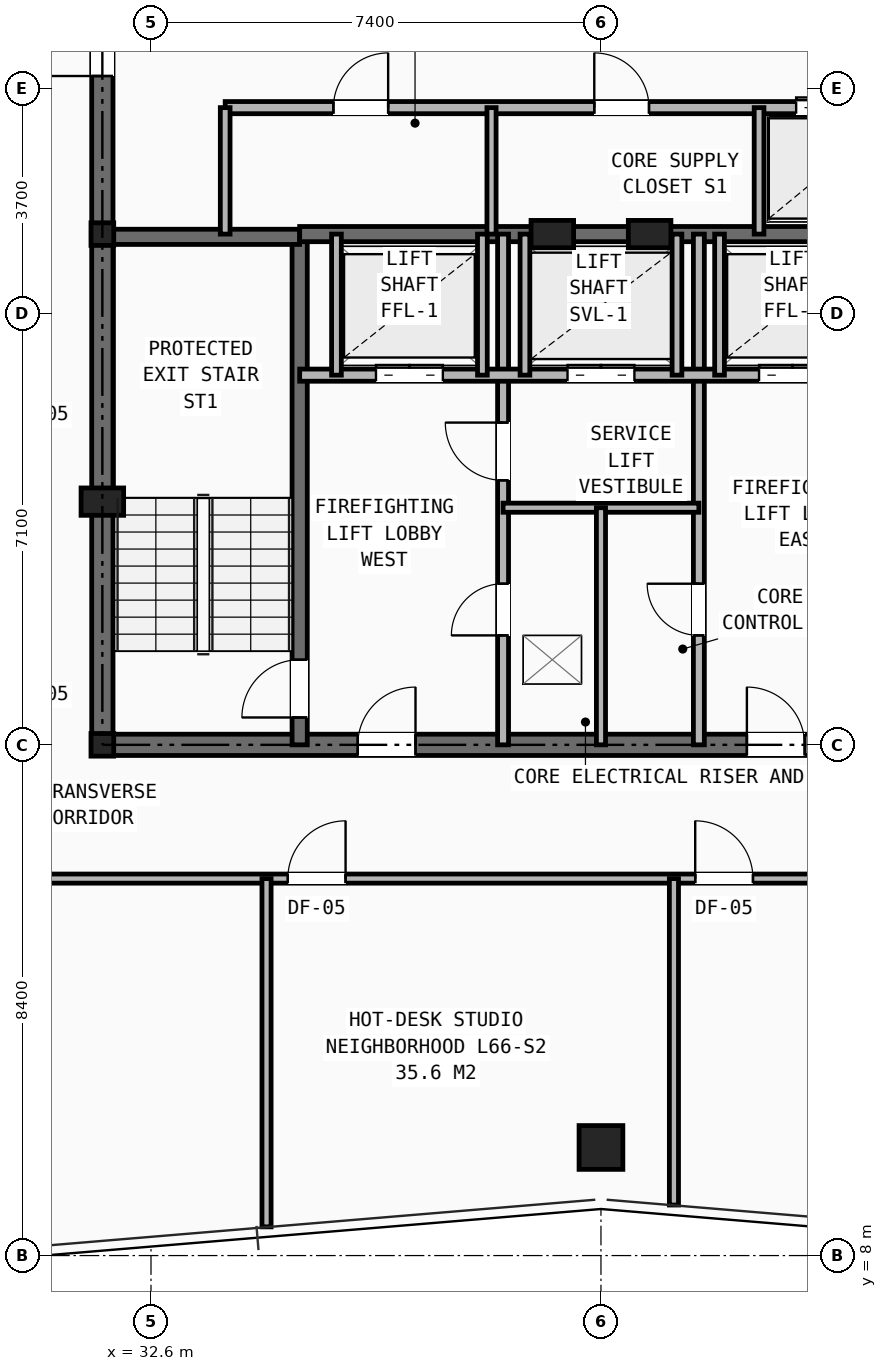
"""IFC4 building model, lengths in metres.
Left out: names, types, materials, properties, quantities, classifications, styles, units other than length and angle.
Written with IfcOpenShell. Run it as: python <this file> out.ifc"""

import sys

from ifc_helpers import new_model, si_unit, direction, frame, frame_2d, origin, origin_2d, place, context, subcontext, project, spatial, rectangle, hollow_rectangle, i_section, extrude, element, fill, save


model = new_model("IFC4")
c1 = context("Model", 3, precision=1e-05, world=origin(), true_north=direction((0.0, 1.0)))
c2 = subcontext(c1, "Body", "Model", "MODEL_VIEW")
j1 = project(units=[si_unit("LENGTHUNIT", "METRE"), si_unit("PLANEANGLEUNIT", "RADIAN")], contexts=[c1])
p1 = place(None, origin())
s1 = spatial("IfcSite", under=j1, at=p1, CompositionType="ELEMENT")
p2 = place(p1, origin())
s2 = spatial("IfcBuilding", under=s1, at=p2, CompositionType="ELEMENT")
p3 = place(p2, frame((0.0, 0.0, 232.9)))
s3 = spatial("IfcBuildingStorey", under=s2, at=p3, CompositionType="ELEMENT", Elevation=232.9)
for number, where, z_axis, x_axis in (
    (1, (31.8, 16.4, 0.0), (0.0, 0.0, 1.0), (1.0, 0.0, 0.0)),
    (2, (31.8, 24.8, 0.0), (0.0, 0.0, 1.0), (1.0, 0.0, 0.0)),
):
    element("IfcColumn", number, at=place(p3, frame(where, z_axis=z_axis, x_axis=x_axis)), inside=s3, PredefinedType="COLUMN", context=c2, shape_type="SweptSolid", body=[
        extrude(i_section(OverallWidth=0.374, OverallDepth=0.372, WebThickness=0.016, FlangeThickness=0.026, at=origin_2d()), origin(), (0.0, 0.0, 1.0), 3.5),
    ])
for number, where, z_axis, x_axis in (
    (3, (31.8, 20.4, 0.0), (0.0, 0.0, 1.0), (1.0, 0.0, 0.0)),
    (4, (39.2, 24.8, 0.0), (0.0, 0.0, 1.0), (1.0, 0.0, 0.0)),
    (5, (40.8, 24.8, 0.0), (0.0, 0.0, 1.0), (1.0, 0.0, 0.0)),
):
    element("IfcColumn", number, at=place(p3, frame(where, z_axis=z_axis, x_axis=x_axis)), inside=s3, PredefinedType="PILASTER", context=c2, shape_type="SweptSolid", body=[
        extrude(rectangle(XDim=0.7, YDim=0.45, at=origin_2d()), origin(), (0.0, 0.0, 1.0), 3.5),
    ])
p4 = place(p3, frame((40.0, 9.778, 0.0), z_axis=(0.0, 0.0, 1.0), x_axis=(1.0, 0.0, 0.0)))
e6 = element("IfcColumn", 6, at=p4, inside=s3, PredefinedType="COLUMN", context=c2, shape_type="SweptSolid", body=[
    extrude(hollow_rectangle(XDim=0.72, YDim=0.72, WallThickness=0.05, at=origin_2d()), origin(), (0.0, 0.0, 1.0), 3.5),
])
p5 = place(p3, frame((31.8, 16.4, 0.0), z_axis=(0.0, 0.0, 1.0), x_axis=(1.0, 0.0, 0.0)))
e7 = element("IfcWall", 7, at=p5, inside=s3, PredefinedType="SHEAR", context=c2, shape_type="SweptSolid", body=[
    extrude(rectangle(XDim=16.4, YDim=0.35, at=frame_2d((8.2, 0.0))), origin(), (0.0, 0.0, 1.0), 3.25),
])
p6 = place(p5, frame((4.2, 0.0, 0.0)))
e8 = element("IfcOpeningElement", 8, at=p6, cuts=e7, PredefinedType="OPENING", context=c2, shape_type="SweptSolid", body=[
    extrude(rectangle(XDim=0.95, YDim=2.1, at=frame_2d((0.475, 1.05))), frame((0.0, 0.185, 0.0), z_axis=(0.0, -1.0, 0.0), x_axis=(1.0, 0.0, 0.0)), (0.0, 0.0, 1.0), 0.37),
])
p7 = place(p5, frame((10.6, 0.0, 0.0)))
e9 = element("IfcOpeningElement", 9, at=p7, cuts=e7, PredefinedType="OPENING", context=c2, shape_type="SweptSolid", body=[
    extrude(rectangle(XDim=0.95, YDim=2.1, at=frame_2d((0.475, 1.05))), frame((0.0, 0.185, 0.0), z_axis=(0.0, -1.0, 0.0), x_axis=(1.0, 0.0, 0.0)), (0.0, 0.0, 1.0), 0.37),
])
p8 = place(p3, frame((31.8, 16.4, 0.0), z_axis=(0.0, 0.0, 1.0), x_axis=(0.0, 1.0, 0.0)))
e10 = element("IfcWall", 10, at=p8, inside=s3, PredefinedType="SHEAR", context=c2, shape_type="SweptSolid", body=[
    extrude(rectangle(XDim=14.8, YDim=0.35, at=frame_2d((7.4, 0.0))), origin(), (0.0, 0.0, 1.0), 3.25),
])
p9 = place(p8, frame((11.0, 0.0, 0.0)))
e11 = element("IfcOpeningElement", 11, at=p9, cuts=e10, PredefinedType="OPENING", context=c2, shape_type="SweptSolid", body=[
    extrude(rectangle(XDim=1.1, YDim=2.15, at=frame_2d((0.55, 1.075))), frame((0.0, 0.185, 0.0), z_axis=(0.0, -1.0, 0.0), x_axis=(1.0, 0.0, 0.0)), (0.0, 0.0, 1.0), 0.37),
])
p10 = place(p3, frame((35.045, 16.4, 0.0), z_axis=(0.0, 0.0, 1.0), x_axis=(0.0, 1.0, 0.0)))
e12 = element("IfcWall", 12, at=p10, inside=s3, PredefinedType="SHEAR", context=c2, shape_type="SweptSolid", body=[
    extrude(rectangle(XDim=8.4, YDim=0.25, at=frame_2d((4.2, 0.0))), origin(), (0.0, 0.0, 1.0), 3.25),
])
p11 = place(p10, frame((0.45, 0.0, 0.0)))
e13 = element("IfcOpeningElement", 13, at=p11, cuts=e12, PredefinedType="OPENING", context=c2, shape_type="SweptSolid", body=[
    extrude(rectangle(XDim=0.95, YDim=2.1, at=frame_2d((0.475, 1.05))), frame((0.0, 0.135, 0.0), z_axis=(0.0, -1.0, 0.0), x_axis=(1.0, 0.0, 0.0)), (0.0, 0.0, 1.0), 0.27),
])
p12 = place(p3, frame((31.8, 24.755, 0.0), z_axis=(0.0, 0.0, 1.0), x_axis=(1.0, 0.0, 0.0)))
e14 = element("IfcWall", 14, at=p12, inside=s3, PredefinedType="SHEAR", context=c2, shape_type="SweptSolid", body=[
    extrude(rectangle(XDim=3.245, YDim=0.25, at=frame_2d((1.623, 0.0))), origin(), (0.0, 0.0, 1.0), 3.25),
])
p13 = place(p3, frame((35.045, 24.8, 0.0), z_axis=(0.0, 0.0, 1.0), x_axis=(1.0, 0.0, 0.0)))
e15 = element("IfcWall", 15, at=p13, inside=s3, PredefinedType="SHEAR", context=c2, shape_type="SweptSolid", body=[
    extrude(rectangle(XDim=9.91, YDim=0.25, at=frame_2d((4.955, 0.0))), origin(), (0.0, 0.0, 1.0), 3.25),
])
p14 = place(p3, frame((38.39, 16.4, 0.0), z_axis=(0.0, 0.0, 1.0), x_axis=(0.0, 1.0, 0.0)))
e16 = element("IfcWall", 16, at=p14, inside=s3, PredefinedType="PARTITIONING", context=c2, shape_type="SweptSolid", body=[
    extrude(rectangle(XDim=8.4, YDim=0.18, at=frame_2d((4.2, 0.0))), origin(), (0.0, 0.0, 1.0), 2.705),
])
p15 = place(p14, frame((1.8, 0.0, 0.0)))
e17 = element("IfcOpeningElement", 17, at=p15, cuts=e16, PredefinedType="OPENING", context=c2, shape_type="SweptSolid", body=[
    extrude(rectangle(XDim=0.85, YDim=2.05, at=frame_2d((0.425, 1.025))), frame((0.0, 0.1, 0.0), z_axis=(0.0, -1.0, 0.0), x_axis=(1.0, 0.0, 0.0)), (0.0, 0.0, 1.0), 0.2),
])
p16 = place(p14, frame((4.35, 0.0, 0.0)))
e18 = element("IfcOpeningElement", 18, at=p16, cuts=e16, PredefinedType="OPENING", context=c2, shape_type="SweptSolid", body=[
    extrude(rectangle(XDim=0.95, YDim=2.1, at=frame_2d((0.475, 1.05))), frame((0.0, 0.1, 0.0), z_axis=(0.0, -1.0, 0.0), x_axis=(1.0, 0.0, 0.0)), (0.0, 0.0, 1.0), 0.2),
])
p17 = place(p3, frame((41.61, 16.4, 0.0), z_axis=(0.0, 0.0, 1.0), x_axis=(0.0, 1.0, 0.0)))
e19 = element("IfcWall", 19, at=p17, inside=s3, PredefinedType="PARTITIONING", context=c2, shape_type="SweptSolid", body=[
    extrude(rectangle(XDim=8.4, YDim=0.18, at=frame_2d((4.2, 0.0))), origin(), (0.0, 0.0, 1.0), 2.705),
])
p18 = place(p17, frame((1.8, 0.0, 0.0)))
e20 = element("IfcOpeningElement", 20, at=p18, cuts=e19, PredefinedType="OPENING", context=c2, shape_type="SweptSolid", body=[
    extrude(rectangle(XDim=0.85, YDim=2.05, at=frame_2d((0.425, 1.025))), frame((0.0, 0.1, 0.0), z_axis=(0.0, -1.0, 0.0), x_axis=(1.0, 0.0, 0.0)), (0.0, 0.0, 1.0), 0.2),
])
p19 = place(p3, frame((35.045, 22.48, 0.0), z_axis=(0.0, 0.0, 1.0), x_axis=(1.0, 0.0, 0.0)))
e21 = element("IfcWall", 21, at=p19, inside=s3, PredefinedType="SOLIDWALL", context=c2, shape_type="SweptSolid", body=[
    extrude(rectangle(XDim=9.91, YDim=0.2, at=frame_2d((4.955, 0.0))), origin(), (0.0, 0.0, 1.0), 3.25),
])
p20 = place(p19, frame((1.255, 0.0, 0.0)))
e22 = element("IfcOpeningElement", 22, at=p20, cuts=e21, PredefinedType="OPENING", context=c2, shape_type="SweptSolid", body=[
    extrude(rectangle(XDim=1.1, YDim=2.15, at=frame_2d((0.55, 1.075))), frame((0.0, 0.11, 0.0), z_axis=(0.0, -1.0, 0.0), x_axis=(1.0, 0.0, 0.0)), (0.0, 0.0, 1.0), 0.22),
])
p21 = place(p19, frame((7.555, 0.0, 0.0)))
e23 = element("IfcOpeningElement", 23, at=p21, cuts=e21, PredefinedType="OPENING", context=c2, shape_type="SweptSolid", body=[
    extrude(rectangle(XDim=1.1, YDim=2.15, at=frame_2d((0.55, 1.075))), frame((0.0, 0.11, 0.0), z_axis=(0.0, -1.0, 0.0), x_axis=(1.0, 0.0, 0.0)), (0.0, 0.0, 1.0), 0.22),
])
p22 = place(p19, frame((4.405, 0.0, 0.0)))
e24 = element("IfcOpeningElement", 24, at=p22, cuts=e21, PredefinedType="OPENING", context=c2, shape_type="SweptSolid", body=[
    extrude(rectangle(XDim=1.1, YDim=2.15, at=frame_2d((0.55, 1.075))), frame((0.0, 0.11, 0.0), z_axis=(0.0, -1.0, 0.0), x_axis=(1.0, 0.0, 0.0)), (0.0, 0.0, 1.0), 0.22),
])
p23 = place(p3, frame((38.39, 20.3, 0.0), z_axis=(0.0, 0.0, 1.0), x_axis=(1.0, 0.0, 0.0)))
e25 = element("IfcWall", 25, at=p23, inside=s3, PredefinedType="PARTITIONING", context=c2, shape_type="SweptSolid", body=[
    extrude(rectangle(XDim=3.22, YDim=0.15, at=frame_2d((1.61, 0.0))), origin(), (0.0, 0.0, 1.0), 3.25),
])
p24 = place(p3, frame((40.0, 16.4, 0.0), z_axis=(0.0, 0.0, 1.0), x_axis=(0.0, 1.0, 0.0)))
e26 = element("IfcWall", 26, at=p24, inside=s3, PredefinedType="PARTITIONING", context=c2, shape_type="SweptSolid", body=[
    extrude(rectangle(XDim=3.9, YDim=0.15, at=frame_2d((1.95, 0.0))), origin(), (0.0, 0.0, 1.0), 2.705),
])
for number, where, z_axis, x_axis in (
    (27, (35.65, 22.48, 0.0), (0.0, 0.0, 1.0), (0.0, 1.0, 0.0)),
    (28, (38.05, 22.48, 0.0), (0.0, 0.0, 1.0), (0.0, 1.0, 0.0)),
    (29, (41.95, 22.48, 0.0), (0.0, 0.0, 1.0), (0.0, 1.0, 0.0)),
    (30, (38.75, 22.48, 0.0), (0.0, 0.0, 1.0), (0.0, 1.0, 0.0)),
    (31, (41.25, 22.48, 0.0), (0.0, 0.0, 1.0), (0.0, 1.0, 0.0)),
):
    element("IfcWall", number, at=place(p3, frame(where, z_axis=z_axis, x_axis=x_axis)), inside=s3, PredefinedType="SOLIDWALL", context=c2, shape_type="SweptSolid", body=[
        extrude(rectangle(XDim=2.32, YDim=0.16, at=frame_2d((1.16, 0.0))), origin(), (0.0, 0.0, 1.0), 3.25),
    ])
p25 = place(p3, frame((33.82, 26.88, 0.0), z_axis=(0.0, 0.0, 1.0), x_axis=(1.0, 0.0, 0.0)))
e32 = element("IfcWall", 32, at=p25, inside=s3, PredefinedType="SOLIDWALL", context=c2, shape_type="SweptSolid", body=[
    extrude(rectangle(XDim=14.38, YDim=0.2, at=frame_2d((7.19, 0.0))), origin(), (0.0, 0.0, 1.0), 2.705),
])
p26 = place(p25, frame((1.78, 0.0, 0.0)))
e33 = element("IfcOpeningElement", 33, at=p26, cuts=e32, PredefinedType="OPENING", context=c2, shape_type="SweptSolid", body=[
    extrude(rectangle(XDim=0.9, YDim=2.1, at=frame_2d((0.45, 1.05))), frame((0.0, 0.11, 0.0), z_axis=(0.0, -1.0, 0.0), x_axis=(1.0, 0.0, 0.0)), (0.0, 0.0, 1.0), 0.22),
])
p27 = place(p25, frame((6.07, 0.0, 0.0)))
e34 = element("IfcOpeningElement", 34, at=p27, cuts=e32, PredefinedType="OPENING", context=c2, shape_type="SweptSolid", body=[
    extrude(rectangle(XDim=0.9, YDim=2.1, at=frame_2d((0.45, 1.05))), frame((0.0, 0.11, 0.0), z_axis=(0.0, -1.0, 0.0), x_axis=(1.0, 0.0, 0.0)), (0.0, 0.0, 1.0), 0.22),
])
p28 = place(p25, frame((9.39, 0.0, 0.0)))
e35 = element("IfcOpeningElement", 35, at=p28, cuts=e32, PredefinedType="OPENING", context=c2, shape_type="SweptSolid", body=[
    extrude(rectangle(XDim=1.1, YDim=2.15, at=frame_2d((0.55, 1.075))), frame((0.0, 0.11, 0.0), z_axis=(0.0, -1.0, 0.0), x_axis=(1.0, 0.0, 0.0)), (0.0, 0.0, 1.0), 0.22),
])
p29 = place(p25, frame((11.71, 0.0, 0.0)))
e36 = element("IfcOpeningElement", 36, at=p29, cuts=e32, PredefinedType="OPENING", context=c2, shape_type="SweptSolid", body=[
    extrude(rectangle(XDim=1.1, YDim=2.15, at=frame_2d((0.55, 1.075))), frame((0.0, 0.11, 0.0), z_axis=(0.0, -1.0, 0.0), x_axis=(1.0, 0.0, 0.0)), (0.0, 0.0, 1.0), 0.22),
])
p30 = place(p3, frame((33.82, 24.8, 0.0), z_axis=(0.0, 0.0, 1.0), x_axis=(0.0, 1.0, 0.0)))
e37 = element("IfcWall", 37, at=p30, inside=s3, PredefinedType="SOLIDWALL", context=c2, shape_type="SweptSolid", body=[
    extrude(rectangle(XDim=2.08, YDim=0.16, at=frame_2d((1.04, 0.0))), origin(), (0.0, 0.0, 1.0), 3.25),
])
p31 = place(p3, frame((38.2, 24.8, 0.0), z_axis=(0.0, 0.0, 1.0), x_axis=(0.0, 1.0, 0.0)))
e38 = element("IfcWall", 38, at=p31, inside=s3, PredefinedType="PARTITIONING", context=c2, shape_type="SweptSolid", body=[
    extrude(rectangle(XDim=2.08, YDim=0.15, at=frame_2d((1.04, 0.0))), origin(), (0.0, 0.0, 1.0), 3.25),
])
p32 = place(p3, frame((42.6, 24.8, 0.0), z_axis=(0.0, 0.0, 1.0), x_axis=(0.0, 1.0, 0.0)))
e39 = element("IfcWall", 39, at=p32, inside=s3, PredefinedType="SOLIDWALL", context=c2, shape_type="SweptSolid", body=[
    extrude(rectangle(XDim=2.08, YDim=0.16, at=frame_2d((1.04, 0.0))), origin(), (0.0, 0.0, 1.0), 3.25),
])
p33 = place(p3, frame((25.5, 14.2, 0.0), z_axis=(0.0, 0.0, 1.0), x_axis=(1.0, 0.0, 0.0)))
e40 = element("IfcWall", 40, at=p33, inside=s3, PredefinedType="PARTITIONING", context=c2, shape_type="SweptSolid", body=[
    extrude(rectangle(XDim=29.0, YDim=0.15, at=frame_2d((14.5, 0.0))), origin(), (0.0, 0.0, 1.0), 2.265),
])
p34 = place(p33, frame((0.85, 0.0, 0.0)))
e41 = element("IfcOpeningElement", 41, at=p34, cuts=e40, PredefinedType="OPENING", context=c2, shape_type="SweptSolid", body=[
    extrude(rectangle(XDim=0.95, YDim=2.1, at=frame_2d((0.475, 1.05))), frame((0.0, 0.085, 0.0), z_axis=(0.0, -1.0, 0.0), x_axis=(1.0, 0.0, 0.0)), (0.0, 0.0, 1.0), 0.17),
])
p35 = place(p33, frame((9.35, 0.0, 0.0)))
e42 = element("IfcOpeningElement", 42, at=p35, cuts=e40, PredefinedType="OPENING", context=c2, shape_type="SweptSolid", body=[
    extrude(rectangle(XDim=0.95, YDim=2.1, at=frame_2d((0.475, 1.05))), frame((0.0, 0.085, 0.0), z_axis=(0.0, -1.0, 0.0), x_axis=(1.0, 0.0, 0.0)), (0.0, 0.0, 1.0), 0.17),
])
p36 = place(p33, frame((16.05, 0.0, 0.0)))
e43 = element("IfcOpeningElement", 43, at=p36, cuts=e40, PredefinedType="OPENING", context=c2, shape_type="SweptSolid", body=[
    extrude(rectangle(XDim=0.95, YDim=2.1, at=frame_2d((0.475, 1.05))), frame((0.0, 0.085, 0.0), z_axis=(0.0, -1.0, 0.0), x_axis=(1.0, 0.0, 0.0)), (0.0, 0.0, 1.0), 0.17),
])
p37 = place(p3, frame((34.5, 8.472, 0.0), z_axis=(0.0, 0.0, 1.0), x_axis=(0.0, 1.0, 0.0)))
e44 = element("IfcWall", 44, at=p37, inside=s3, PredefinedType="PARTITIONING", context=c2, shape_type="SweptSolid", body=[
    extrude(rectangle(XDim=5.728, YDim=0.15, at=frame_2d((2.864, 0.0))), origin(), (0.0, 0.0, 1.0), 2.265),
])
p38 = place(p3, frame((41.2, 8.831, 0.0), z_axis=(0.0, 0.0, 1.0), x_axis=(0.0, 1.0, 0.0)))
e45 = element("IfcWall", 45, at=p38, inside=s3, PredefinedType="PARTITIONING", context=c2, shape_type="SweptSolid", body=[
    extrude(rectangle(XDim=5.369, YDim=0.15, at=frame_2d((2.684, 0.0))), origin(), (0.0, 0.0, 1.0), 2.628),
])
p39 = place(p15, origin())
e46 = element("IfcDoor", 46, at=p39, inside=s3, OperationType="SINGLE_SWING_LEFT", PredefinedType="DOOR", context=c2, shape_type="SweptSolid", body=[
    extrude(rectangle(XDim=0.85, YDim=2.05, at=frame_2d((0.425, 1.025))), frame((0.0, 0.025, 0.0), z_axis=(0.0, -1.0, 0.0), x_axis=(1.0, 0.0, 0.0)), (0.0, 0.0, 1.0), 0.05),
])
fill(e17, e46)
p40 = place(p18, origin())
e47 = element("IfcDoor", 47, at=p40, inside=s3, OperationType="SINGLE_SWING_RIGHT", PredefinedType="DOOR", context=c2, shape_type="SweptSolid", body=[
    extrude(rectangle(XDim=0.85, YDim=2.05, at=frame_2d((0.425, 1.025))), frame((0.0, 0.025, 0.0), z_axis=(0.0, -1.0, 0.0), x_axis=(1.0, 0.0, 0.0)), (0.0, 0.0, 1.0), 0.05),
])
fill(e20, e47)
p41 = place(p16, origin())
e48 = element("IfcDoor", 48, at=p41, inside=s3, OperationType="SINGLE_SWING_RIGHT", PredefinedType="DOOR", context=c2, shape_type="SweptSolid", body=[
    extrude(rectangle(XDim=0.95, YDim=2.1, at=frame_2d((0.475, 1.05))), frame((0.0, 0.025, 0.0), z_axis=(0.0, -1.0, 0.0), x_axis=(1.0, 0.0, 0.0)), (0.0, 0.0, 1.0), 0.05),
])
fill(e18, e48)
p42 = place(p11, origin())
e49 = element("IfcDoor", 49, at=p42, inside=s3, OperationType="SINGLE_SWING_LEFT", PredefinedType="DOOR", context=c2, shape_type="SweptSolid", body=[
    extrude(rectangle(XDim=0.95, YDim=2.1, at=frame_2d((0.475, 1.05))), frame((0.0, 0.025, 0.0), z_axis=(0.0, -1.0, 0.0), x_axis=(1.0, 0.0, 0.0)), (0.0, 0.0, 1.0), 0.05),
])
fill(e13, e49)
p43 = place(p6, origin())
e50 = element("IfcDoor", 50, at=p43, inside=s3, OperationType="SINGLE_SWING_RIGHT", PredefinedType="DOOR", context=c2, shape_type="SweptSolid", body=[
    extrude(rectangle(XDim=0.95, YDim=2.1, at=frame_2d((0.475, 1.05))), frame((0.0, 0.025, 0.0), z_axis=(0.0, -1.0, 0.0), x_axis=(1.0, 0.0, 0.0)), (0.0, 0.0, 1.0), 0.05),
])
fill(e8, e50)
p44 = place(p7, origin())
e51 = element("IfcDoor", 51, at=p44, inside=s3, OperationType="SINGLE_SWING_LEFT", PredefinedType="DOOR", context=c2, shape_type="SweptSolid", body=[
    extrude(rectangle(XDim=0.95, YDim=2.1, at=frame_2d((0.475, 1.05))), frame((0.0, 0.025, 0.0), z_axis=(0.0, -1.0, 0.0), x_axis=(1.0, 0.0, 0.0)), (0.0, 0.0, 1.0), 0.05),
])
fill(e9, e51)
p45 = place(p20, origin())
e52 = element("IfcDoor", 52, at=p45, inside=s3, OperationType="DOUBLE_DOOR_SLIDING", PredefinedType="DOOR", context=c2, shape_type="SweptSolid", body=[
    extrude(rectangle(XDim=1.1, YDim=2.15, at=frame_2d((0.55, 1.075))), frame((0.0, 0.025, 0.0), z_axis=(0.0, -1.0, 0.0), x_axis=(1.0, 0.0, 0.0)), (0.0, 0.0, 1.0), 0.05),
])
fill(e22, e52)
p46 = place(p21, origin())
e53 = element("IfcDoor", 53, at=p46, inside=s3, OperationType="DOUBLE_DOOR_SLIDING", PredefinedType="DOOR", context=c2, shape_type="SweptSolid", body=[
    extrude(rectangle(XDim=1.1, YDim=2.15, at=frame_2d((0.55, 1.075))), frame((0.0, 0.025, 0.0), z_axis=(0.0, -1.0, 0.0), x_axis=(1.0, 0.0, 0.0)), (0.0, 0.0, 1.0), 0.05),
])
fill(e23, e53)
p47 = place(p22, origin())
e54 = element("IfcDoor", 54, at=p47, inside=s3, OperationType="DOUBLE_DOOR_SLIDING", PredefinedType="DOOR", context=c2, shape_type="SweptSolid", body=[
    extrude(rectangle(XDim=1.1, YDim=2.15, at=frame_2d((0.55, 1.075))), frame((0.0, 0.025, 0.0), z_axis=(0.0, -1.0, 0.0), x_axis=(1.0, 0.0, 0.0)), (0.0, 0.0, 1.0), 0.05),
])
fill(e24, e54)
p48 = place(p9, origin())
e55 = element("IfcDoor", 55, at=p48, inside=s3, OperationType="SINGLE_SWING_LEFT", PredefinedType="DOOR", context=c2, shape_type="SweptSolid", body=[
    extrude(rectangle(XDim=1.1, YDim=2.15, at=frame_2d((0.55, 1.075))), frame((0.0, 0.025, 0.0), z_axis=(0.0, -1.0, 0.0), x_axis=(1.0, 0.0, 0.0)), (0.0, 0.0, 1.0), 0.05),
])
fill(e11, e55)
p49 = place(p26, origin())
e56 = element("IfcDoor", 56, at=p49, inside=s3, OperationType="SINGLE_SWING_RIGHT", PredefinedType="DOOR", context=c2, shape_type="SweptSolid", body=[
    extrude(rectangle(XDim=0.9, YDim=2.1, at=frame_2d((0.45, 1.05))), frame((0.0, 0.025, 0.0), z_axis=(0.0, -1.0, 0.0), x_axis=(1.0, 0.0, 0.0)), (0.0, 0.0, 1.0), 0.05),
])
fill(e33, e56)
p50 = place(p27, origin())
e57 = element("IfcDoor", 57, at=p50, inside=s3, OperationType="SINGLE_SWING_LEFT", PredefinedType="DOOR", context=c2, shape_type="SweptSolid", body=[
    extrude(rectangle(XDim=0.9, YDim=2.1, at=frame_2d((0.45, 1.05))), frame((0.0, 0.025, 0.0), z_axis=(0.0, -1.0, 0.0), x_axis=(1.0, 0.0, 0.0)), (0.0, 0.0, 1.0), 0.05),
])
fill(e34, e57)
p51 = place(p28, origin())
e58 = element("IfcDoor", 58, at=p51, inside=s3, OperationType="DOUBLE_DOOR_SLIDING", PredefinedType="DOOR", context=c2, shape_type="SweptSolid", body=[
    extrude(rectangle(XDim=1.1, YDim=2.15, at=frame_2d((0.55, 1.075))), frame((0.0, 0.025, 0.0), z_axis=(0.0, -1.0, 0.0), x_axis=(1.0, 0.0, 0.0)), (0.0, 0.0, 1.0), 0.05),
])
fill(e35, e58)
p52 = place(p35, origin())
e59 = element("IfcDoor", 59, at=p52, inside=s3, OperationType="SINGLE_SWING_RIGHT", PredefinedType="DOOR", context=c2, shape_type="SweptSolid", body=[
    extrude(rectangle(XDim=0.95, YDim=2.1, at=frame_2d((0.475, 1.05))), frame((0.0, 0.025, 0.0), z_axis=(0.0, -1.0, 0.0), x_axis=(1.0, 0.0, 0.0)), (0.0, 0.0, 1.0), 0.05),
])
fill(e42, e59)
p53 = place(p36, origin())
e60 = element("IfcDoor", 60, at=p53, inside=s3, OperationType="SINGLE_SWING_LEFT", PredefinedType="DOOR", context=c2, shape_type="SweptSolid", body=[
    extrude(rectangle(XDim=0.95, YDim=2.1, at=frame_2d((0.475, 1.05))), frame((0.0, 0.025, 0.0), z_axis=(0.0, -1.0, 0.0), x_axis=(1.0, 0.0, 0.0)), (0.0, 0.0, 1.0), 0.05),
])
fill(e43, e60)
save(model, sys.argv[1])
